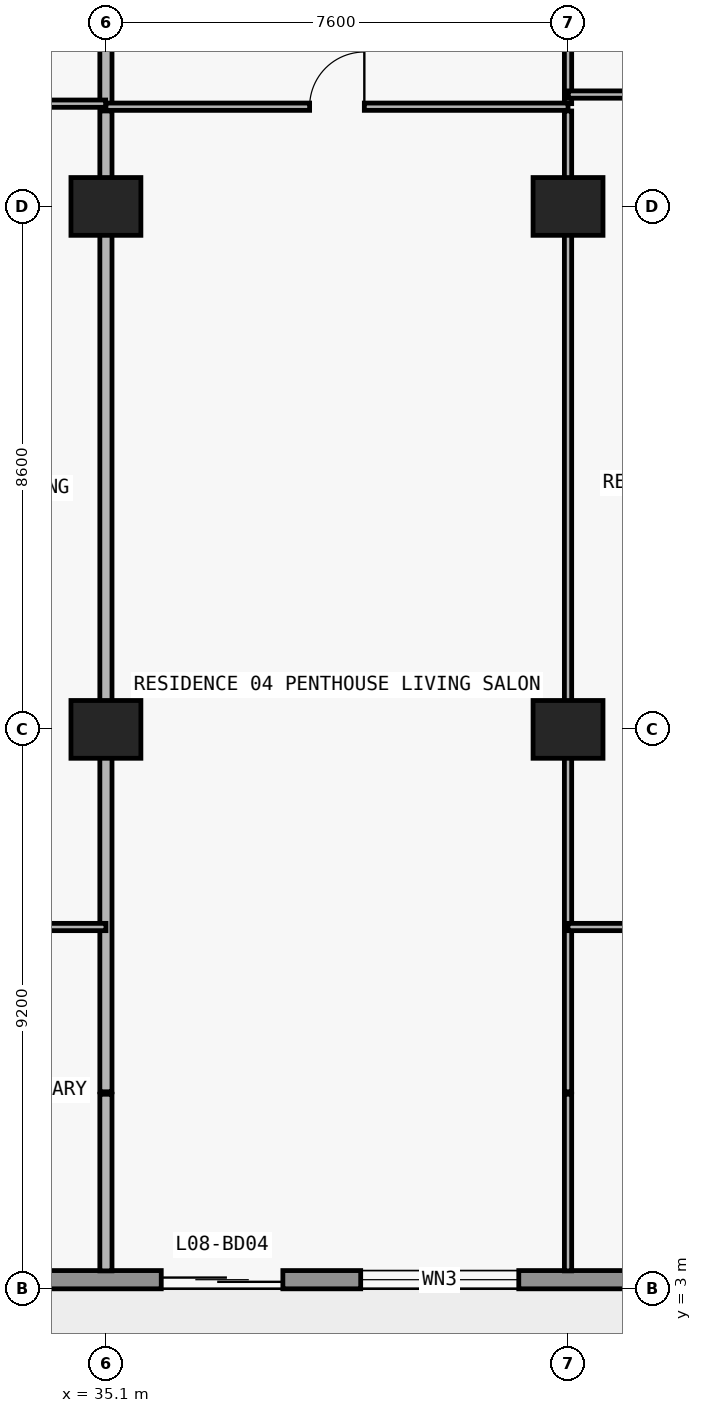
"""IFC4 building model, lengths in metres.
Left out: names, types, materials, properties, quantities, classifications, styles, units other than length and angle.
Written with IfcOpenShell. Run it as: python <this file> out.ifc"""

import sys

from ifc_helpers import new_model, si_unit, direction, frame, frame_2d, origin, origin_2d, place, context, subcontext, project, spatial, rectangle, extrude, element, fill, save


model = new_model("IFC4")
c1 = context("Model", 3, precision=1e-05, world=origin(), true_north=direction((0.0, 1.0)))
c2 = subcontext(c1, "Body", "Model", "MODEL_VIEW")
j1 = project(units=[si_unit("LENGTHUNIT", "METRE"), si_unit("PLANEANGLEUNIT", "RADIAN")], contexts=[c1])
p1 = place(None, origin())
s1 = spatial("IfcSite", under=j1, at=p1, CompositionType="ELEMENT")
p2 = place(p1, origin())
s2 = spatial("IfcBuilding", under=s1, at=p2, CompositionType="ELEMENT")
p3 = place(p2, frame((0.0, 0.0, 36.6)))
s3 = spatial("IfcBuildingStorey", under=s2, at=p3, CompositionType="ELEMENT", Elevation=36.6)
for number, where, z_axis, x_axis in (
    (1, (35.1, 12.2, 0.0), (0.0, 0.0, 1.0), (1.0, 0.0, 0.0)),
    (2, (42.7, 12.2, 0.0), (0.0, 0.0, 1.0), (1.0, 0.0, 0.0)),
    (3, (35.1, 20.8, 0.0), (0.0, 0.0, 1.0), (1.0, 0.0, 0.0)),
    (4, (42.7, 20.8, 0.0), (0.0, 0.0, 1.0), (1.0, 0.0, 0.0)),
):
    element("IfcColumn", number, at=place(p3, frame(where, z_axis=z_axis, x_axis=x_axis)), inside=s3, PredefinedType="COLUMN", context=c2, shape_type="SweptSolid", body=[
        extrude(rectangle(XDim=1.15, YDim=0.95, at=origin_2d()), origin(), (0.0, 0.0, 1.0), 3.05),
    ])
p4 = place(p3, frame((72.7, 3.15, 0.0), z_axis=(0.0, 0.0, 1.0), x_axis=(-1.0, 0.0, 0.0)))
e5 = element("IfcWall", 5, at=p4, inside=s3, PredefinedType="STANDARD", context=c2, shape_type="SweptSolid", body=[
    extrude(rectangle(XDim=67.6, YDim=0.3, at=frame_2d((33.8, 0.0))), origin(), (0.0, 0.0, 1.0), 3.05),
])
p5 = place(p4, frame((59.826, 0.0, 0.0)))
e6 = element("IfcOpeningElement", 6, at=p5, cuts=e5, PredefinedType="OPENING", context=c2, shape_type="SweptSolid", body=[
    extrude(rectangle(XDim=2.0, YDim=2.3, at=frame_2d((1.0, 1.15))), frame((0.0, 0.16, 0.0), z_axis=(0.0, -1.0, 0.0), x_axis=(1.0, 0.0, 0.0)), (0.0, 0.0, 1.0), 0.32),
])
p6 = place(p4, frame((55.526, 0.0, 0.85)))
e7 = element("IfcOpeningElement", 7, at=p6, cuts=e5, PredefinedType="OPENING", context=c2, shape_type="SweptSolid", body=[
    extrude(rectangle(XDim=2.2, YDim=1.55, at=frame_2d((1.1, 0.775))), frame((0.0, 0.16, 0.0), z_axis=(0.0, -1.0, 0.0), x_axis=(1.0, 0.0, 0.0)), (0.0, 0.0, 1.0), 0.32),
])
p7 = place(p4, frame((51.09, 0.0, 0.0)))
e8 = element("IfcOpeningElement", 8, at=p7, cuts=e5, PredefinedType="OPENING", context=c2, shape_type="SweptSolid", body=[
    extrude(rectangle(XDim=2.0, YDim=2.3, at=frame_2d((1.0, 1.15))), frame((0.0, 0.16, 0.0), z_axis=(0.0, -1.0, 0.0), x_axis=(1.0, 0.0, 0.0)), (0.0, 0.0, 1.0), 0.32),
])
p8 = place(p4, frame((46.99, 0.0, 0.85)))
e9 = element("IfcOpeningElement", 9, at=p8, cuts=e5, PredefinedType="OPENING", context=c2, shape_type="SweptSolid", body=[
    extrude(rectangle(XDim=1.8, YDim=1.55, at=frame_2d((0.9, 0.775))), frame((0.0, 0.16, 0.0), z_axis=(0.0, -1.0, 0.0), x_axis=(1.0, 0.0, 0.0)), (0.0, 0.0, 1.0), 0.32),
])
p9 = place(p4, frame((43.026, 0.0, 0.0)))
e10 = element("IfcOpeningElement", 10, at=p9, cuts=e5, PredefinedType="OPENING", context=c2, shape_type="SweptSolid", body=[
    extrude(rectangle(XDim=2.0, YDim=2.3, at=frame_2d((1.0, 1.15))), frame((0.0, 0.16, 0.0), z_axis=(0.0, -1.0, 0.0), x_axis=(1.0, 0.0, 0.0)), (0.0, 0.0, 1.0), 0.32),
])
p10 = place(p4, frame((38.726, 0.0, 0.85)))
e11 = element("IfcOpeningElement", 11, at=p10, cuts=e5, PredefinedType="OPENING", context=c2, shape_type="SweptSolid", body=[
    extrude(rectangle(XDim=2.2, YDim=1.55, at=frame_2d((1.1, 0.775))), frame((0.0, 0.16, 0.0), z_axis=(0.0, -1.0, 0.0), x_axis=(1.0, 0.0, 0.0)), (0.0, 0.0, 1.0), 0.32),
])
p11 = place(p4, frame((34.69, 0.0, 0.0)))
e12 = element("IfcOpeningElement", 12, at=p11, cuts=e5, PredefinedType="OPENING", context=c2, shape_type="SweptSolid", body=[
    extrude(rectangle(XDim=2.0, YDim=2.3, at=frame_2d((1.0, 1.15))), frame((0.0, 0.16, 0.0), z_axis=(0.0, -1.0, 0.0), x_axis=(1.0, 0.0, 0.0)), (0.0, 0.0, 1.0), 0.32),
])
p12 = place(p4, frame((30.81, 0.0, 0.65)))
e13 = element("IfcOpeningElement", 13, at=p12, cuts=e5, PredefinedType="OPENING", context=c2, shape_type="SweptSolid", body=[
    extrude(rectangle(XDim=2.6, YDim=1.85, at=frame_2d((1.3, 0.925))), frame((0.0, 0.16, 0.0), z_axis=(0.0, -1.0, 0.0), x_axis=(1.0, 0.0, 0.0)), (0.0, 0.0, 1.0), 0.32),
])
p13 = place(p4, frame((24.7, 0.0, 0.85)))
e14 = element("IfcOpeningElement", 14, at=p13, cuts=e5, PredefinedType="OPENING", context=c2, shape_type="SweptSolid", body=[
    extrude(rectangle(XDim=2.2, YDim=1.55, at=frame_2d((1.1, 0.775))), frame((0.0, 0.16, 0.0), z_axis=(0.0, -1.0, 0.0), x_axis=(1.0, 0.0, 0.0)), (0.0, 0.0, 1.0), 0.32),
])
p14 = place(p4, frame((18.626, 0.0, 0.0)))
e15 = element("IfcOpeningElement", 15, at=p14, cuts=e5, PredefinedType="OPENING", context=c2, shape_type="SweptSolid", body=[
    extrude(rectangle(XDim=2.0, YDim=2.3, at=frame_2d((1.0, 1.15))), frame((0.0, 0.16, 0.0), z_axis=(0.0, -1.0, 0.0), x_axis=(1.0, 0.0, 0.0)), (0.0, 0.0, 1.0), 0.32),
])
p15 = place(p4, frame((14.326, 0.0, 0.85)))
e16 = element("IfcOpeningElement", 16, at=p15, cuts=e5, PredefinedType="OPENING", context=c2, shape_type="SweptSolid", body=[
    extrude(rectangle(XDim=2.2, YDim=1.55, at=frame_2d((1.1, 0.775))), frame((0.0, 0.16, 0.0), z_axis=(0.0, -1.0, 0.0), x_axis=(1.0, 0.0, 0.0)), (0.0, 0.0, 1.0), 0.32),
])
p16 = place(p4, frame((9.89, 0.0, 0.0)))
e17 = element("IfcOpeningElement", 17, at=p16, cuts=e5, PredefinedType="OPENING", context=c2, shape_type="SweptSolid", body=[
    extrude(rectangle(XDim=2.0, YDim=2.3, at=frame_2d((1.0, 1.15))), frame((0.0, 0.16, 0.0), z_axis=(0.0, -1.0, 0.0), x_axis=(1.0, 0.0, 0.0)), (0.0, 0.0, 1.0), 0.32),
])
p17 = place(p4, frame((5.79, 0.0, 0.85)))
e18 = element("IfcOpeningElement", 18, at=p17, cuts=e5, PredefinedType="OPENING", context=c2, shape_type="SweptSolid", body=[
    extrude(rectangle(XDim=1.8, YDim=1.55, at=frame_2d((0.9, 0.775))), frame((0.0, 0.16, 0.0), z_axis=(0.0, -1.0, 0.0), x_axis=(1.0, 0.0, 0.0)), (0.0, 0.0, 1.0), 0.32),
])
p18 = place(p3, frame((35.1, 3.295, 0.0), z_axis=(0.0, 0.0, 1.0), x_axis=(0.0, 1.0, 0.0)))
e19 = element("IfcWall", 19, at=p18, inside=s3, PredefinedType="PARTITIONING", context=c2, shape_type="SweptSolid", body=[
    extrude(rectangle(XDim=2.905, YDim=0.2, at=frame_2d((1.453, 0.0))), origin(), (0.0, 0.0, 1.0), 3.05),
])
p19 = place(p3, frame((35.1, 6.24, 0.0), z_axis=(0.0, 0.0, 1.0), x_axis=(0.0, 1.0, 0.0)))
e20 = element("IfcWall", 20, at=p19, inside=s3, PredefinedType="PARTITIONING", context=c2, shape_type="SweptSolid", body=[
    extrude(rectangle(XDim=16.13, YDim=0.2, at=frame_2d((8.065, 0.0))), origin(), (0.0, 0.0, 1.0), 2.11),
])
p20 = place(p3, frame((35.1, 22.49, 0.0), z_axis=(0.0, 0.0, 1.0), x_axis=(0.0, 1.0, 0.0)))
e21 = element("IfcWall", 21, at=p20, inside=s3, PredefinedType="PARTITIONING", context=c2, shape_type="SweptSolid", body=[
    extrude(rectangle(XDim=4.69, YDim=0.2, at=frame_2d((2.345, 0.0))), origin(), (0.0, 0.0, 1.0), 2.11),
])
p21 = place(p3, frame((42.7, 3.295, 0.0), z_axis=(0.0, 0.0, 1.0), x_axis=(0.0, 1.0, 0.0)))
e22 = element("IfcWall", 22, at=p21, inside=s3, PredefinedType="PARTITIONING", context=c2, shape_type="SweptSolid", body=[
    extrude(rectangle(XDim=2.905, YDim=0.12, at=frame_2d((1.453, 0.0))), origin(), (0.0, 0.0, 1.0), 3.05),
])
p22 = place(p3, frame((42.7, 6.24, 0.0), z_axis=(0.0, 0.0, 1.0), x_axis=(0.0, 1.0, 0.0)))
e23 = element("IfcWall", 23, at=p22, inside=s3, PredefinedType="PARTITIONING", context=c2, shape_type="SweptSolid", body=[
    extrude(rectangle(XDim=16.13, YDim=0.12, at=frame_2d((8.065, 0.0))), origin(), (0.0, 0.0, 1.0), 2.11),
])
p23 = place(p3, frame((42.7, 22.49, 0.0), z_axis=(0.0, 0.0, 1.0), x_axis=(0.0, 1.0, 0.0)))
e24 = element("IfcWall", 24, at=p23, inside=s3, PredefinedType="PARTITIONING", context=c2, shape_type="SweptSolid", body=[
    extrude(rectangle(XDim=4.69, YDim=0.12, at=frame_2d((2.345, 0.0))), origin(), (0.0, 0.0, 1.0), 2.11),
])
p24 = place(p23, frame((1.9, 0.0, 0.0)))
e25 = element("IfcOpeningElement", 25, at=p24, cuts=e24, PredefinedType="OPENING", context=c2, shape_type="SweptSolid", body=[
    extrude(rectangle(XDim=0.9, YDim=2.06, at=frame_2d((0.45, 1.03))), frame((0.0, 0.07, 0.0), z_axis=(0.0, -1.0, 0.0), x_axis=(1.0, 0.0, 0.0)), (0.0, 0.0, 1.0), 0.14),
])
p25 = place(p3, frame((30.648, 8.95, 0.0), z_axis=(0.0, 0.0, 1.0), x_axis=(1.0, 0.0, 0.0)))
e26 = element("IfcWall", 26, at=p25, inside=s3, PredefinedType="PARTITIONING", context=c2, shape_type="SweptSolid", body=[
    extrude(rectangle(XDim=4.452, YDim=0.12, at=frame_2d((2.226, 0.0))), origin(), (0.0, 0.0, 1.0), 3.05),
])
p26 = place(p25, frame((1.776, 0.0, 0.0)))
e27 = element("IfcOpeningElement", 27, at=p26, cuts=e26, PredefinedType="OPENING", context=c2, shape_type="SweptSolid", body=[
    extrude(rectangle(XDim=0.9, YDim=2.15, at=frame_2d((0.45, 1.075))), frame((0.0, 0.07, 0.0), z_axis=(0.0, -1.0, 0.0), x_axis=(1.0, 0.0, 0.0)), (0.0, 0.0, 1.0), 0.14),
])
p27 = place(p3, frame((42.7, 8.95, 0.0), z_axis=(0.0, 0.0, 1.0), x_axis=(1.0, 0.0, 0.0)))
e28 = element("IfcWall", 28, at=p27, inside=s3, PredefinedType="PARTITIONING", context=c2, shape_type="SweptSolid", body=[
    extrude(rectangle(XDim=8.4, YDim=0.12, at=frame_2d((4.2, 0.0))), origin(), (0.0, 0.0, 1.0), 3.05),
])
p28 = place(p27, frame((3.75, 0.0, 0.0)))
e29 = element("IfcOpeningElement", 29, at=p28, cuts=e28, PredefinedType="OPENING", context=c2, shape_type="SweptSolid", body=[
    extrude(rectangle(XDim=0.9, YDim=2.15, at=frame_2d((0.45, 1.075))), frame((0.0, 0.07, 0.0), z_axis=(0.0, -1.0, 0.0), x_axis=(1.0, 0.0, 0.0)), (0.0, 0.0, 1.0), 0.14),
])
p29 = place(p3, frame((35.1, 22.44, 0.0), z_axis=(0.0, 0.0, 1.0), x_axis=(1.0, 0.0, 0.0)))
e30 = element("IfcWall", 30, at=p29, inside=s3, PredefinedType="PARTITIONING", context=c2, shape_type="SweptSolid", body=[
    extrude(rectangle(XDim=7.6, YDim=0.12, at=frame_2d((3.8, 0.0))), origin(), (0.0, 0.0, 1.0), 3.05),
])
p30 = place(p29, frame((3.35, 0.0, 0.0)))
e31 = element("IfcOpeningElement", 31, at=p30, cuts=e30, PredefinedType="OPENING", context=c2, shape_type="SweptSolid", body=[
    extrude(rectangle(XDim=0.9, YDim=2.15, at=frame_2d((0.45, 1.075))), frame((0.0, 0.07, 0.0), z_axis=(0.0, -1.0, 0.0), x_axis=(1.0, 0.0, 0.0)), (0.0, 0.0, 1.0), 0.14),
])
p31 = place(p3, frame((26.97, 22.49, 0.0), z_axis=(0.0, 0.0, 1.0), x_axis=(1.0, 0.0, 0.0)))
e32 = element("IfcWall", 32, at=p31, inside=s3, PredefinedType="PARTITIONING", context=c2, shape_type="SweptSolid", body=[
    extrude(rectangle(XDim=8.125, YDim=0.12, at=frame_2d((4.062, 0.0))), origin(), (0.0, 0.0, 1.0), 3.05),
])
p32 = place(p31, frame((1.389, 0.0, 0.0)))
e33 = element("IfcOpeningElement", 33, at=p32, cuts=e32, PredefinedType="OPENING", context=c2, shape_type="SweptSolid", body=[
    extrude(rectangle(XDim=0.9, YDim=2.15, at=frame_2d((0.45, 1.075))), frame((0.0, 0.07, 0.0), z_axis=(0.0, -1.0, 0.0), x_axis=(1.0, 0.0, 0.0)), (0.0, 0.0, 1.0), 0.14),
])
p33 = place(p31, frame((5.621, 0.0, 0.0)))
e34 = element("IfcOpeningElement", 34, at=p33, cuts=e32, PredefinedType="OPENING", context=c2, shape_type="SweptSolid", body=[
    extrude(rectangle(XDim=0.9, YDim=2.15, at=frame_2d((0.45, 1.075))), frame((0.0, 0.07, 0.0), z_axis=(0.0, -1.0, 0.0), x_axis=(1.0, 0.0, 0.0)), (0.0, 0.0, 1.0), 0.14),
])
p34 = place(p3, frame((42.705, 22.64, 0.0), z_axis=(0.0, 0.0, 1.0), x_axis=(1.0, 0.0, 0.0)))
e35 = element("IfcWall", 35, at=p34, inside=s3, PredefinedType="PARTITIONING", context=c2, shape_type="SweptSolid", body=[
    extrude(rectangle(XDim=8.125, YDim=0.12, at=frame_2d((4.062, 0.0))), origin(), (0.0, 0.0, 1.0), 3.05),
])
p35 = place(p34, frame((3.613, 0.0, 0.0)))
e36 = element("IfcOpeningElement", 36, at=p35, cuts=e35, PredefinedType="OPENING", context=c2, shape_type="SweptSolid", body=[
    extrude(rectangle(XDim=0.9, YDim=2.15, at=frame_2d((0.45, 1.075))), frame((0.0, 0.07, 0.0), z_axis=(0.0, -1.0, 0.0), x_axis=(1.0, 0.0, 0.0)), (0.0, 0.0, 1.0), 0.14),
])
p36 = place(p11, origin())
e37 = element("IfcDoor", 37, at=p36, inside=s3, OperationType="DOUBLE_DOOR_SLIDING", PredefinedType="DOOR", context=c2, shape_type="SweptSolid", body=[
    extrude(rectangle(XDim=2.0, YDim=2.3, at=frame_2d((1.0, 1.15))), frame((0.0, 0.025, 0.0), z_axis=(0.0, -1.0, 0.0), x_axis=(1.0, 0.0, 0.0)), (0.0, 0.0, 1.0), 0.05),
])
fill(e12, e37)
p37 = place(p12, origin())
e38 = element("IfcWindow", 38, at=p37, inside=s3, PartitioningType="SINGLE_PANEL", PredefinedType="WINDOW", context=c2, shape_type="SweptSolid", body=[
    extrude(rectangle(XDim=2.6, YDim=1.85, at=frame_2d((1.3, 0.925))), frame((0.0, 0.03, 0.0), z_axis=(0.0, -1.0, 0.0), x_axis=(1.0, 0.0, 0.0)), (0.0, 0.0, 1.0), 0.06),
])
fill(e13, e38)
p38 = place(p30, origin())
e39 = element("IfcDoor", 39, at=p38, inside=s3, OperationType="SINGLE_SWING_RIGHT", PredefinedType="DOOR", context=c2, shape_type="SweptSolid", body=[
    extrude(rectangle(XDim=0.9, YDim=2.15, at=frame_2d((0.45, 1.075))), frame((0.0, 0.025, 0.0), z_axis=(0.0, -1.0, 0.0), x_axis=(1.0, 0.0, 0.0)), (0.0, 0.0, 1.0), 0.05),
])
fill(e31, e39)
save(model, sys.argv[1])
